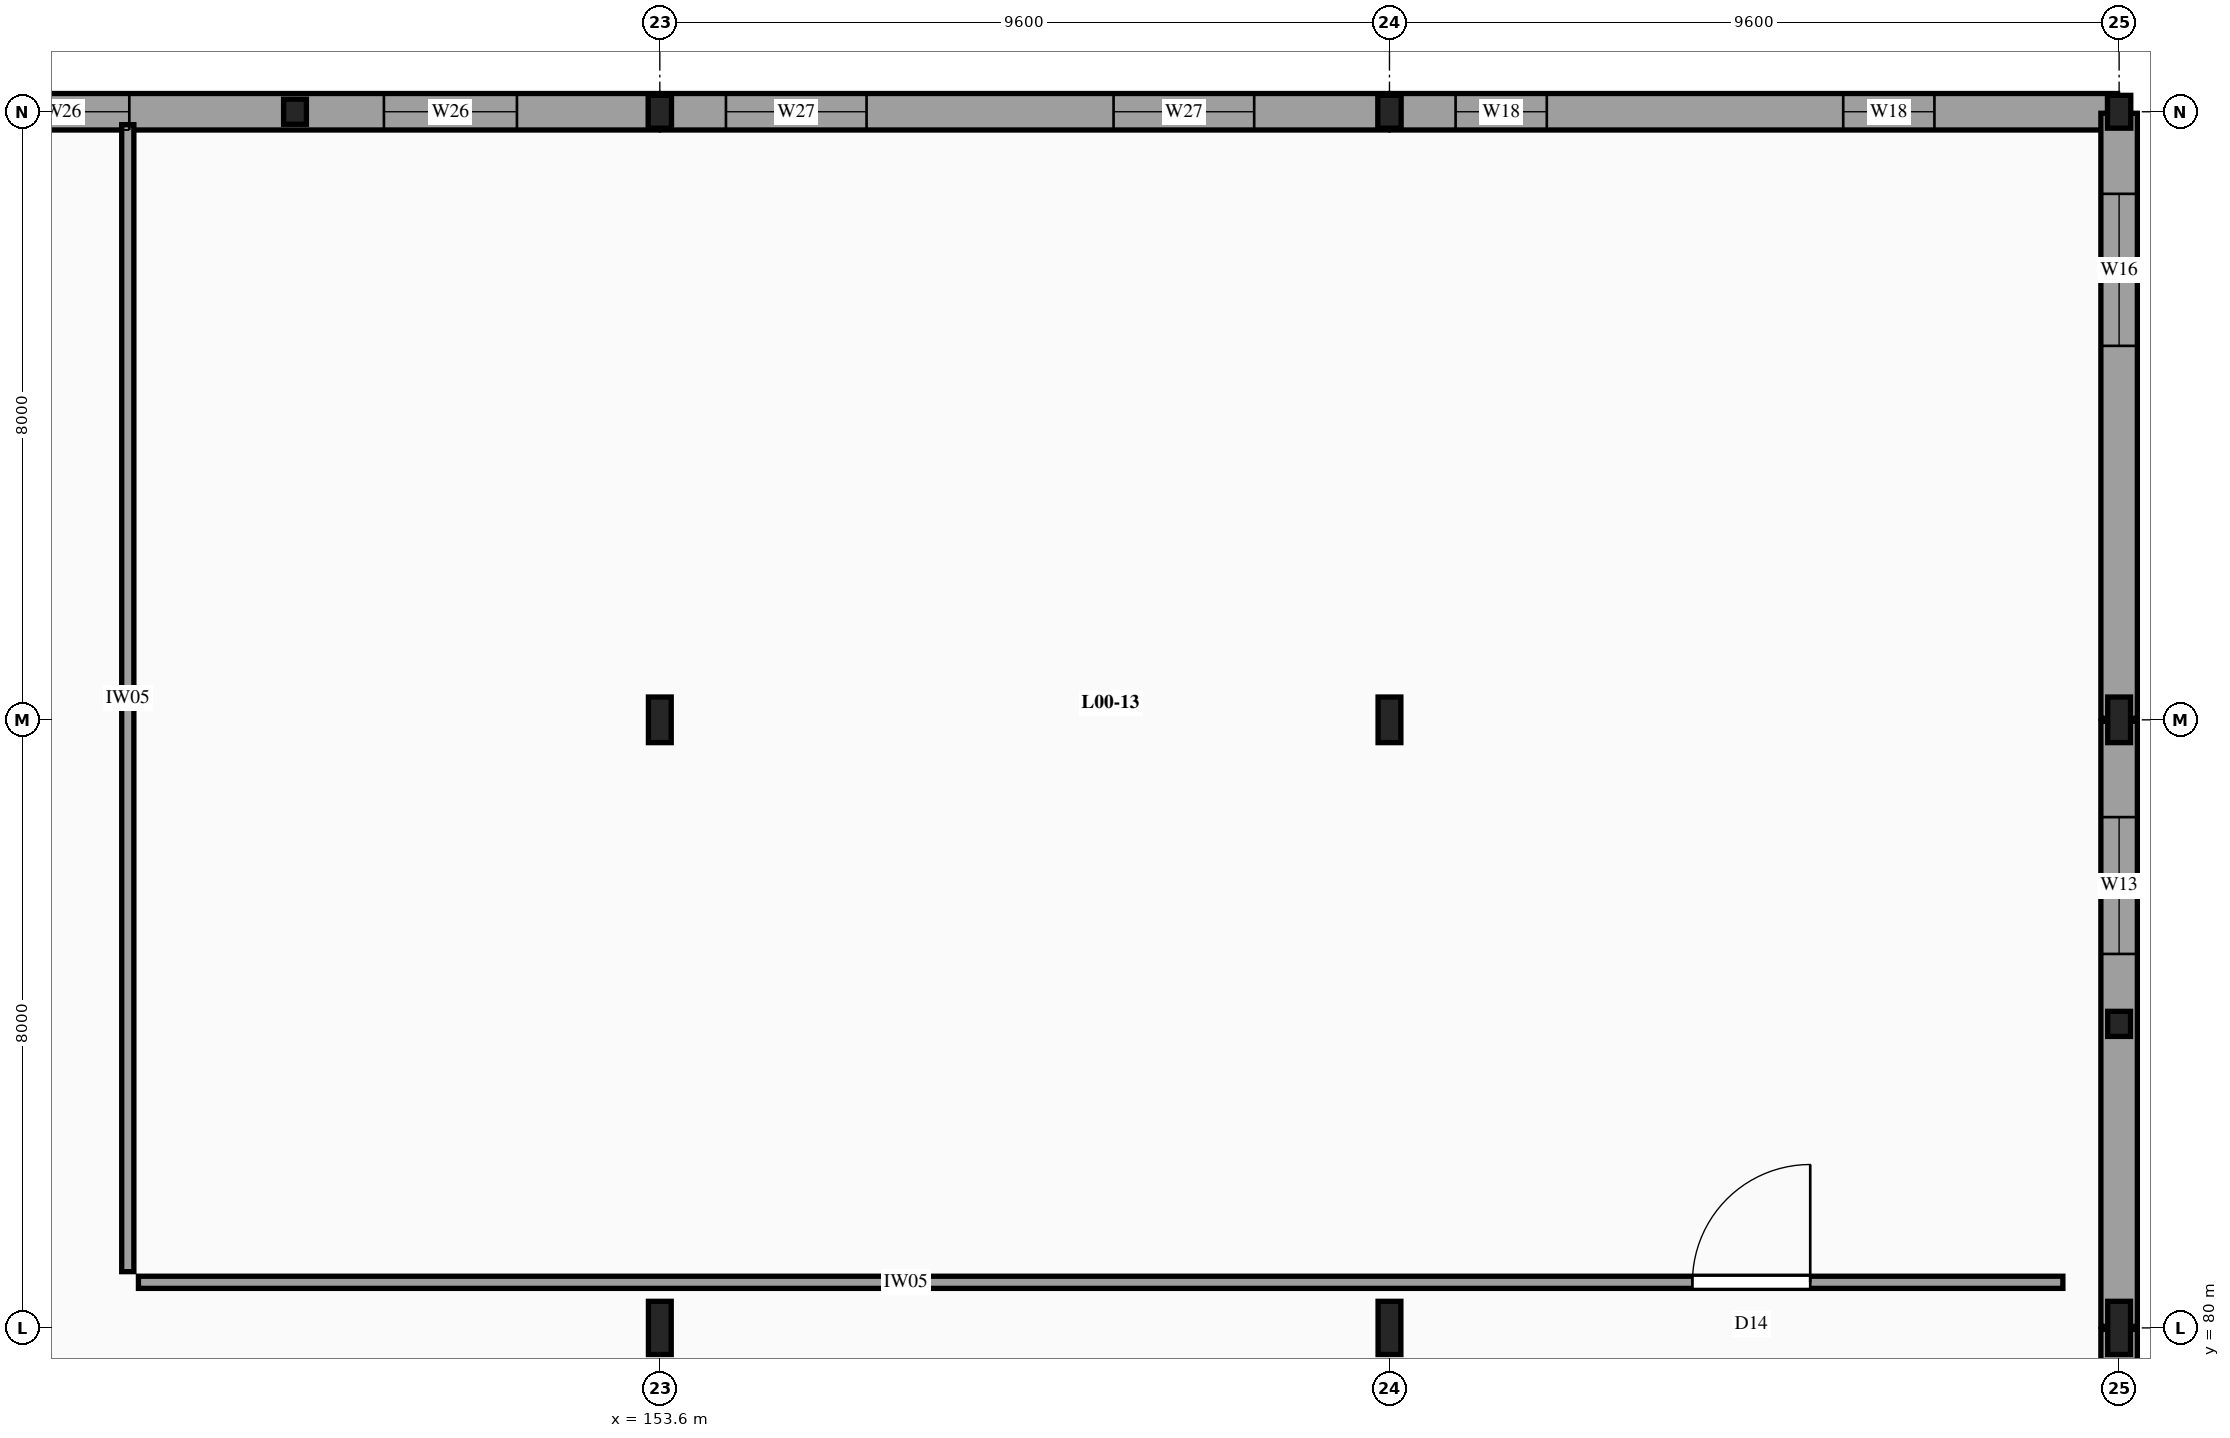
"""IFC4 building model, lengths in metres.
Left out: names, types, materials, properties, quantities, classifications, styles, units other than length and angle.
Written with IfcOpenShell. Run it as: python <this file> out.ifc"""

import sys

from ifc_helpers import new_model, si_unit, direction, frame, frame_2d, origin, origin_2d, place, context, subcontext, project, spatial, rectangle, i_section, extrude, element, fill, save


model = new_model("IFC4")
c1 = context("Model", 3, precision=1e-05, world=origin(), true_north=direction((0.0, 1.0)))
c2 = subcontext(c1, "Body", "Model", "MODEL_VIEW")
j1 = project(units=[si_unit("LENGTHUNIT", "METRE"), si_unit("PLANEANGLEUNIT", "RADIAN")], contexts=[c1])
p1 = place(None, origin())
s1 = spatial("IfcSite", under=j1, at=p1, CompositionType="ELEMENT")
p2 = place(p1, origin())
s2 = spatial("IfcBuilding", under=s1, at=p2, CompositionType="ELEMENT")
p3 = place(p2, origin())
s3 = spatial("IfcBuildingStorey", under=s2, at=p3, CompositionType="ELEMENT", Elevation=0.0)
p4 = place(p3, frame((153.6, 80.0, -0.28), z_axis=(0.0, 0.0, 1.0), x_axis=(1.0, 0.0, 0.0)))
e1 = element("IfcColumn", 1, at=p4, inside=s3, PredefinedType="COLUMN", context=c2, shape_type="SweptSolid", body=[
    extrude(i_section(OverallWidth=0.3, OverallDepth=0.7, WebThickness=0.017, FlangeThickness=0.032, FilletRadius=0.027, at=origin_2d()), origin(), (0.0, 0.0, 1.0), 4.52),
])
p5 = place(p3, frame((153.6, 88.0, -0.28), z_axis=(0.0, 0.0, 1.0), x_axis=(1.0, 0.0, 0.0)))
e2 = element("IfcColumn", 2, at=p5, inside=s3, PredefinedType="COLUMN", context=c2, shape_type="SweptSolid", body=[
    extrude(i_section(OverallWidth=0.3, OverallDepth=0.6, WebThickness=0.015, FlangeThickness=0.03, FilletRadius=0.027, at=origin_2d()), origin(), (0.0, 0.0, 1.0), 4.52),
])
p6 = place(p3, frame((153.6, 96.0, -0.28), z_axis=(0.0, 0.0, 1.0), x_axis=(1.0, 0.0, 0.0)))
e3 = element("IfcColumn", 3, at=p6, inside=s3, PredefinedType="COLUMN", context=c2, shape_type="SweptSolid", body=[
    extrude(i_section(OverallWidth=0.307, OverallDepth=0.432, WebThickness=0.021, FlangeThickness=0.04, FilletRadius=0.027, at=origin_2d()), origin(), (0.0, 0.0, 1.0), 4.52),
])
p7 = place(p3, frame((163.2, 80.0, -0.28), z_axis=(0.0, 0.0, 1.0), x_axis=(1.0, 0.0, 0.0)))
e4 = element("IfcColumn", 4, at=p7, inside=s3, PredefinedType="COLUMN", context=c2, shape_type="SweptSolid", body=[
    extrude(i_section(OverallWidth=0.3, OverallDepth=0.7, WebThickness=0.017, FlangeThickness=0.032, FilletRadius=0.027, at=origin_2d()), origin(), (0.0, 0.0, 1.0), 4.52),
])
p8 = place(p3, frame((163.2, 88.0, -0.28), z_axis=(0.0, 0.0, 1.0), x_axis=(1.0, 0.0, 0.0)))
e5 = element("IfcColumn", 5, at=p8, inside=s3, PredefinedType="COLUMN", context=c2, shape_type="SweptSolid", body=[
    extrude(i_section(OverallWidth=0.3, OverallDepth=0.6, WebThickness=0.015, FlangeThickness=0.03, FilletRadius=0.027, at=origin_2d()), origin(), (0.0, 0.0, 1.0), 4.52),
])
p9 = place(p3, frame((163.2, 96.0, -0.28), z_axis=(0.0, 0.0, 1.0), x_axis=(1.0, 0.0, 0.0)))
e6 = element("IfcColumn", 6, at=p9, inside=s3, PredefinedType="COLUMN", context=c2, shape_type="SweptSolid", body=[
    extrude(i_section(OverallWidth=0.307, OverallDepth=0.432, WebThickness=0.021, FlangeThickness=0.04, FilletRadius=0.027, at=origin_2d()), origin(), (0.0, 0.0, 1.0), 4.52),
])
p10 = place(p3, frame((172.8, 80.0, -0.28), z_axis=(0.0, 0.0, 1.0), x_axis=(1.0, 0.0, 0.0)))
e7 = element("IfcColumn", 7, at=p10, inside=s3, PredefinedType="COLUMN", context=c2, shape_type="SweptSolid", body=[
    extrude(i_section(OverallWidth=0.3, OverallDepth=0.7, WebThickness=0.017, FlangeThickness=0.032, FilletRadius=0.027, at=origin_2d()), origin(), (0.0, 0.0, 1.0), 4.52),
])
p11 = place(p3, frame((172.8, 88.0, -0.28), z_axis=(0.0, 0.0, 1.0), x_axis=(1.0, 0.0, 0.0)))
e8 = element("IfcColumn", 8, at=p11, inside=s3, PredefinedType="COLUMN", context=c2, shape_type="SweptSolid", body=[
    extrude(i_section(OverallWidth=0.3, OverallDepth=0.6, WebThickness=0.015, FlangeThickness=0.03, FilletRadius=0.027, at=origin_2d()), origin(), (0.0, 0.0, 1.0), 4.52),
])
p12 = place(p3, frame((172.8, 96.0, -0.28), z_axis=(0.0, 0.0, 1.0), x_axis=(1.0, 0.0, 0.0)))
e9 = element("IfcColumn", 9, at=p12, inside=s3, PredefinedType="COLUMN", context=c2, shape_type="SweptSolid", body=[
    extrude(i_section(OverallWidth=0.307, OverallDepth=0.432, WebThickness=0.021, FlangeThickness=0.04, FilletRadius=0.027, at=origin_2d()), origin(), (0.0, 0.0, 1.0), 4.52),
])
for number, where, z_axis, x_axis in (
    (10, (172.8, 84.0, -0.28), (0.0, 0.0, 1.0), (1.0, 0.0, 0.0)),
    (11, (148.8, 96.0, -0.28), (0.0, 0.0, 1.0), (1.0, 0.0, 0.0)),
):
    element("IfcColumn", number, at=place(p3, frame(where, z_axis=z_axis, x_axis=x_axis)), inside=s3, PredefinedType="PILASTER", context=c2, shape_type="SweptSolid", body=[
        extrude(i_section(OverallWidth=0.3, OverallDepth=0.33, WebThickness=0.01, FlangeThickness=0.017, FilletRadius=0.027, at=origin_2d()), origin(), (0.0, 0.0, 1.0), 4.52),
    ])
p13 = place(p3, frame((144.02, 96.0, 0.0), z_axis=(0.0, 0.0, 1.0), x_axis=(1.0, 0.0, 0.0)))
e12 = element("IfcWall", 12, at=p13, inside=s3, PredefinedType="SOLIDWALL", context=c2, shape_type="SweptSolid", body=[
    extrude(rectangle(XDim=9.56, YDim=0.48, at=frame_2d((4.78, 0.0))), origin(), (0.0, 0.0, 1.0), 3.56),
])
p14 = place(p13, frame((0.85, 0.0, 0.85)))
e13 = element("IfcOpeningElement", 13, at=p14, cuts=e12, PredefinedType="OPENING", context=c2, shape_type="SweptSolid", body=[
    extrude(rectangle(XDim=1.75, YDim=2.3, at=frame_2d((0.875, 1.15))), frame((0.0, 0.25, 0.0), z_axis=(0.0, -1.0, 0.0), x_axis=(1.0, 0.0, 0.0)), (0.0, 0.0, 1.0), 0.5),
])
p15 = place(p13, frame((5.95, 0.0, 0.85)))
e14 = element("IfcOpeningElement", 14, at=p15, cuts=e12, PredefinedType="OPENING", context=c2, shape_type="SweptSolid", body=[
    extrude(rectangle(XDim=1.75, YDim=2.3, at=frame_2d((0.875, 1.15))), frame((0.0, 0.25, 0.0), z_axis=(0.0, -1.0, 0.0), x_axis=(1.0, 0.0, 0.0)), (0.0, 0.0, 1.0), 0.5),
])
p16 = place(p3, frame((153.62, 96.0, 0.0), z_axis=(0.0, 0.0, 1.0), x_axis=(1.0, 0.0, 0.0)))
e15 = element("IfcWall", 15, at=p16, inside=s3, PredefinedType="SOLIDWALL", context=c2, shape_type="SweptSolid", body=[
    extrude(rectangle(XDim=9.56, YDim=0.48, at=frame_2d((4.78, 0.0))), origin(), (0.0, 0.0, 1.0), 3.56),
])
p17 = place(p16, frame((0.85, 0.0, 0.85)))
e16 = element("IfcOpeningElement", 16, at=p17, cuts=e15, PredefinedType="OPENING", context=c2, shape_type="SweptSolid", body=[
    extrude(rectangle(XDim=1.85, YDim=1.9, at=frame_2d((0.925, 0.95))), frame((0.0, 0.25, 0.0), z_axis=(0.0, -1.0, 0.0), x_axis=(1.0, 0.0, 0.0)), (0.0, 0.0, 1.0), 0.5),
])
p18 = place(p16, frame((5.95, 0.0, 0.85)))
e17 = element("IfcOpeningElement", 17, at=p18, cuts=e15, PredefinedType="OPENING", context=c2, shape_type="SweptSolid", body=[
    extrude(rectangle(XDim=1.85, YDim=1.9, at=frame_2d((0.925, 0.95))), frame((0.0, 0.25, 0.0), z_axis=(0.0, -1.0, 0.0), x_axis=(1.0, 0.0, 0.0)), (0.0, 0.0, 1.0), 0.5),
])
p19 = place(p3, frame((163.22, 96.0, 0.0), z_axis=(0.0, 0.0, 1.0), x_axis=(1.0, 0.0, 0.0)))
e18 = element("IfcWall", 18, at=p19, inside=s3, PredefinedType="SOLIDWALL", context=c2, shape_type="SweptSolid", body=[
    extrude(rectangle(XDim=9.56, YDim=0.48, at=frame_2d((4.78, 0.0))), origin(), (0.0, 0.0, 1.0), 3.56),
])
p20 = place(p19, frame((0.85, 0.0, 0.85)))
e19 = element("IfcOpeningElement", 19, at=p20, cuts=e18, PredefinedType="OPENING", context=c2, shape_type="SweptSolid", body=[
    extrude(rectangle(XDim=1.2, YDim=2.0, at=frame_2d((0.6, 1.0))), frame((0.0, 0.25, 0.0), z_axis=(0.0, -1.0, 0.0), x_axis=(1.0, 0.0, 0.0)), (0.0, 0.0, 1.0), 0.5),
])
p21 = place(p19, frame((5.95, 0.0, 0.85)))
e20 = element("IfcOpeningElement", 20, at=p21, cuts=e18, PredefinedType="OPENING", context=c2, shape_type="SweptSolid", body=[
    extrude(rectangle(XDim=1.2, YDim=2.0, at=frame_2d((0.6, 1.0))), frame((0.0, 0.25, 0.0), z_axis=(0.0, -1.0, 0.0), x_axis=(1.0, 0.0, 0.0)), (0.0, 0.0, 1.0), 0.5),
])
p22 = place(p3, frame((172.8, 72.02, 0.0), z_axis=(0.0, 0.0, 1.0), x_axis=(0.0, 1.0, 0.0)))
e21 = element("IfcWall", 21, at=p22, inside=s3, PredefinedType="SOLIDWALL", context=c2, shape_type="SweptSolid", body=[
    extrude(rectangle(XDim=7.96, YDim=0.48, at=frame_2d((3.98, 0.0))), origin(), (0.0, 0.0, 1.0), 3.56),
])
p23 = place(p22, frame((2.6, 0.0, 0.0)))
e22 = element("IfcOpeningElement", 22, at=p23, cuts=e21, PredefinedType="OPENING", context=c2, shape_type="SweptSolid", body=[
    extrude(rectangle(XDim=2.1, YDim=2.4, at=frame_2d((1.05, 1.2))), frame((0.0, 0.25, 0.0), z_axis=(0.0, -1.0, 0.0), x_axis=(1.0, 0.0, 0.0)), (0.0, 0.0, 1.0), 0.5),
])
p24 = place(p3, frame((172.8, 80.02, 0.0), z_axis=(0.0, 0.0, 1.0), x_axis=(0.0, 1.0, 0.0)))
e23 = element("IfcWall", 23, at=p24, inside=s3, PredefinedType="SOLIDWALL", context=c2, shape_type="SweptSolid", body=[
    extrude(rectangle(XDim=7.96, YDim=0.48, at=frame_2d((3.98, 0.0))), origin(), (0.0, 0.0, 1.0), 3.56),
])
p25 = place(p24, frame((4.9, 0.0, 0.72)))
e24 = element("IfcOpeningElement", 24, at=p25, cuts=e23, PredefinedType="OPENING", context=c2, shape_type="SweptSolid", body=[
    extrude(rectangle(XDim=1.8, YDim=1.6, at=frame_2d((0.9, 0.8))), frame((0.0, 0.25, 0.0), z_axis=(0.0, -1.0, 0.0), x_axis=(1.0, 0.0, 0.0)), (0.0, 0.0, 1.0), 0.5),
])
p26 = place(p3, frame((172.8, 88.02, 0.0), z_axis=(0.0, 0.0, 1.0), x_axis=(0.0, 1.0, 0.0)))
e25 = element("IfcWall", 25, at=p26, inside=s3, PredefinedType="SOLIDWALL", context=c2, shape_type="SweptSolid", body=[
    extrude(rectangle(XDim=7.96, YDim=0.48, at=frame_2d((3.98, 0.0))), origin(), (0.0, 0.0, 1.0), 3.56),
])
p27 = place(p26, frame((4.9, 0.0, 0.9)))
e26 = element("IfcOpeningElement", 26, at=p27, cuts=e25, PredefinedType="OPENING", context=c2, shape_type="SweptSolid", body=[
    extrude(rectangle(XDim=2.0, YDim=2.2, at=frame_2d((1.0, 1.1))), frame((0.0, 0.25, 0.0), z_axis=(0.0, -1.0, 0.0), x_axis=(1.0, 0.0, 0.0)), (0.0, 0.0, 1.0), 0.5),
])
p28 = place(p3, frame((146.74, 80.6, 0.0), z_axis=(0.0, 0.0, 1.0), x_axis=(1.0, 0.0, 0.0)))
e27 = element("IfcWall", 27, at=p28, inside=s3, PredefinedType="PARTITIONING", context=c2, shape_type="SweptSolid", body=[
    extrude(rectangle(XDim=25.32, YDim=0.16, at=frame_2d((12.66, 0.0))), origin(), (0.0, 0.0, 1.0), 3.6),
])
p29 = place(p28, frame((20.446, 0.0, 0.0)))
e28 = element("IfcOpeningElement", 28, at=p29, cuts=e27, PredefinedType="OPENING", context=c2, shape_type="SweptSolid", body=[
    extrude(rectangle(XDim=1.55, YDim=2.3, at=frame_2d((0.775, 1.15))), frame((0.0, 0.09, 0.0), z_axis=(0.0, -1.0, 0.0), x_axis=(1.0, 0.0, 0.0)), (0.0, 0.0, 1.0), 0.18),
])
p30 = place(p3, frame((146.6, 80.74, 0.0), z_axis=(0.0, 0.0, 1.0), x_axis=(0.0, 1.0, 0.0)))
e29 = element("IfcWall", 29, at=p30, inside=s3, PredefinedType="PARTITIONING", context=c2, shape_type="SweptSolid", body=[
    extrude(rectangle(XDim=15.09, YDim=0.16, at=frame_2d((7.545, 0.0))), origin(), (0.0, 0.0, 1.0), 3.6),
])
p31 = place(p14, origin())
e30 = element("IfcWindow", 30, at=p31, inside=s3, PartitioningType="SINGLE_PANEL", PredefinedType="WINDOW", context=c2, shape_type="SweptSolid", body=[
    extrude(rectangle(XDim=1.75, YDim=2.3, at=frame_2d((0.875, 1.15))), frame((0.0, 0.03, 0.0), z_axis=(0.0, -1.0, 0.0), x_axis=(1.0, 0.0, 0.0)), (0.0, 0.0, 1.0), 0.06),
])
fill(e13, e30)
p32 = place(p15, origin())
e31 = element("IfcWindow", 31, at=p32, inside=s3, PartitioningType="SINGLE_PANEL", PredefinedType="WINDOW", context=c2, shape_type="SweptSolid", body=[
    extrude(rectangle(XDim=1.75, YDim=2.3, at=frame_2d((0.875, 1.15))), frame((0.0, 0.03, 0.0), z_axis=(0.0, -1.0, 0.0), x_axis=(1.0, 0.0, 0.0)), (0.0, 0.0, 1.0), 0.06),
])
fill(e14, e31)
p33 = place(p17, origin())
e32 = element("IfcWindow", 32, at=p33, inside=s3, PartitioningType="SINGLE_PANEL", PredefinedType="WINDOW", context=c2, shape_type="SweptSolid", body=[
    extrude(rectangle(XDim=1.85, YDim=1.9, at=frame_2d((0.925, 0.95))), frame((0.0, 0.03, 0.0), z_axis=(0.0, -1.0, 0.0), x_axis=(1.0, 0.0, 0.0)), (0.0, 0.0, 1.0), 0.06),
])
fill(e16, e32)
p34 = place(p18, origin())
e33 = element("IfcWindow", 33, at=p34, inside=s3, PartitioningType="SINGLE_PANEL", PredefinedType="WINDOW", context=c2, shape_type="SweptSolid", body=[
    extrude(rectangle(XDim=1.85, YDim=1.9, at=frame_2d((0.925, 0.95))), frame((0.0, 0.03, 0.0), z_axis=(0.0, -1.0, 0.0), x_axis=(1.0, 0.0, 0.0)), (0.0, 0.0, 1.0), 0.06),
])
fill(e17, e33)
p35 = place(p20, origin())
e34 = element("IfcWindow", 34, at=p35, inside=s3, PartitioningType="SINGLE_PANEL", PredefinedType="WINDOW", context=c2, shape_type="SweptSolid", body=[
    extrude(rectangle(XDim=1.2, YDim=2.0, at=frame_2d((0.6, 1.0))), frame((0.0, 0.03, 0.0), z_axis=(0.0, -1.0, 0.0), x_axis=(1.0, 0.0, 0.0)), (0.0, 0.0, 1.0), 0.06),
])
fill(e19, e34)
p36 = place(p21, origin())
e35 = element("IfcWindow", 35, at=p36, inside=s3, PartitioningType="SINGLE_PANEL", PredefinedType="WINDOW", context=c2, shape_type="SweptSolid", body=[
    extrude(rectangle(XDim=1.2, YDim=2.0, at=frame_2d((0.6, 1.0))), frame((0.0, 0.03, 0.0), z_axis=(0.0, -1.0, 0.0), x_axis=(1.0, 0.0, 0.0)), (0.0, 0.0, 1.0), 0.06),
])
fill(e20, e35)
p37 = place(p25, origin())
e36 = element("IfcWindow", 36, at=p37, inside=s3, PartitioningType="SINGLE_PANEL", PredefinedType="WINDOW", context=c2, shape_type="SweptSolid", body=[
    extrude(rectangle(XDim=1.8, YDim=1.6, at=frame_2d((0.9, 0.8))), frame((0.0, 0.03, 0.0), z_axis=(0.0, -1.0, 0.0), x_axis=(1.0, 0.0, 0.0)), (0.0, 0.0, 1.0), 0.06),
])
fill(e24, e36)
p38 = place(p27, origin())
e37 = element("IfcWindow", 37, at=p38, inside=s3, PartitioningType="SINGLE_PANEL", PredefinedType="WINDOW", context=c2, shape_type="SweptSolid", body=[
    extrude(rectangle(XDim=2.0, YDim=2.2, at=frame_2d((1.0, 1.1))), frame((0.0, 0.03, 0.0), z_axis=(0.0, -1.0, 0.0), x_axis=(1.0, 0.0, 0.0)), (0.0, 0.0, 1.0), 0.06),
])
fill(e26, e37)
p39 = place(p29, origin())
e38 = element("IfcDoor", 38, at=p39, inside=s3, OperationType="SINGLE_SWING_RIGHT", PredefinedType="DOOR", context=c2, shape_type="SweptSolid", body=[
    extrude(rectangle(XDim=1.55, YDim=2.3, at=frame_2d((0.775, 1.15))), frame((0.0, 0.025, 0.0), z_axis=(0.0, -1.0, 0.0), x_axis=(1.0, 0.0, 0.0)), (0.0, 0.0, 1.0), 0.05),
])
fill(e28, e38)
save(model, sys.argv[1])
